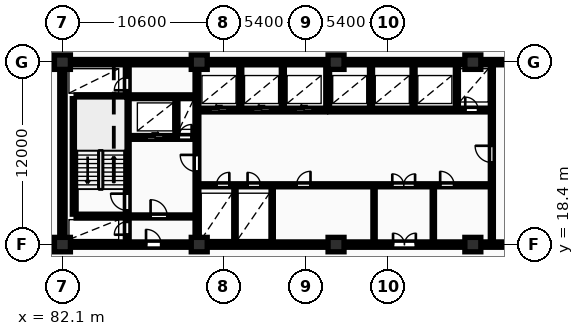
"""IFC4 building model, lengths in metres.
Left out: names, types, materials, properties, quantities, classifications, styles, units other than length and angle.
Written with IfcOpenShell. Run it as: python <this file> out.ifc"""

import sys

from ifc_helpers import new_model, si_unit, direction, frame, frame_2d, origin, origin_2d, place, context, subcontext, project, spatial, rectangle, extrude, element, fill, save


model = new_model("IFC4")
c1 = context("Model", 3, precision=1e-05, world=origin(), true_north=direction((0.0, 1.0)))
c2 = subcontext(c1, "Body", "Model", "MODEL_VIEW")
j1 = project(units=[si_unit("LENGTHUNIT", "METRE"), si_unit("PLANEANGLEUNIT", "RADIAN")], contexts=[c1])
p1 = place(None, origin())
s1 = spatial("IfcSite", under=j1, at=p1, CompositionType="ELEMENT")
p2 = place(p1, origin())
s2 = spatial("IfcBuilding", under=s1, at=p2, CompositionType="ELEMENT")
p3 = place(p2, frame((0.0, 0.0, -3.6)))
s3 = spatial("IfcBuildingStorey", under=s2, at=p3, CompositionType="ELEMENT", Elevation=-3.6)
for number, where, z_axis, x_axis in (
    (1, (82.1, 18.4, 0.0), (0.0, 0.0, 1.0), (1.0, 0.0, 0.0)),
    (2, (82.1, 30.4, 0.0), (0.0, 0.0, 1.0), (1.0, 0.0, 0.0)),
    (3, (91.1, 18.4, 0.0), (0.0, 0.0, 1.0), (1.0, 0.0, 0.0)),
    (4, (91.1, 30.4, 0.0), (0.0, 0.0, 1.0), (1.0, 0.0, 0.0)),
    (5, (100.1, 18.4, 0.0), (0.0, 0.0, 1.0), (1.0, 0.0, 0.0)),
    (6, (100.1, 30.4, 0.0), (0.0, 0.0, 1.0), (1.0, 0.0, 0.0)),
    (7, (109.1, 18.4, 0.0), (0.0, 0.0, 1.0), (1.0, 0.0, 0.0)),
    (8, (109.1, 30.4, 0.0), (0.0, 0.0, 1.0), (1.0, 0.0, 0.0)),
):
    element("IfcColumn", number, at=place(p3, frame(where, z_axis=z_axis, x_axis=x_axis)), inside=s3, PredefinedType="COLUMN", context=c2, shape_type="SweptSolid", body=[
        extrude(rectangle(XDim=1.05, YDim=0.95, at=origin_2d()), origin(), (0.0, 0.0, 1.0), 3.6),
    ])
p4 = place(p3, frame((81.925, 30.4, 0.0), z_axis=(0.0, 0.0, 1.0), x_axis=(1.0, 0.0, 0.0)))
e9 = element("IfcWall", 9, at=p4, inside=s3, PredefinedType="SHEAR", context=c2, shape_type="SweptSolid", body=[
    extrude(rectangle(XDim=36.265, YDim=0.35, at=frame_2d((18.132, 0.0))), origin(), (0.0, 0.0, 1.0), 3.6),
])
p5 = place(p3, frame((82.1, 18.575, 0.0), z_axis=(0.0, 0.0, 1.0), x_axis=(0.0, 1.0, 0.0)))
e10 = element("IfcWall", 10, at=p5, inside=s3, PredefinedType="SHEAR", context=c2, shape_type="SweptSolid", body=[
    extrude(rectangle(XDim=11.65, YDim=0.35, at=frame_2d((5.825, 0.0))), origin(), (0.0, 0.0, 1.0), 3.6),
])
p6 = place(p3, frame((81.925, 18.4, 0.0), z_axis=(0.0, 0.0, 1.0), x_axis=(1.0, 0.0, 0.0)))
e11 = element("IfcWall", 11, at=p6, inside=s3, PredefinedType="SHEAR", context=c2, shape_type="SweptSolid", body=[
    extrude(rectangle(XDim=36.265, YDim=0.35, at=frame_2d((18.132, 0.0))), origin(), (0.0, 0.0, 1.0), 3.6),
])
p7 = place(p6, frame((5.675, 0.0, 0.0)))
e12 = element("IfcOpeningElement", 12, at=p7, cuts=e11, PredefinedType="OPENING", context=c2, shape_type="SweptSolid", body=[
    extrude(rectangle(XDim=1.0, YDim=2.15, at=frame_2d((0.5, 1.075))), frame((0.0, 0.185, 0.0), z_axis=(0.0, -1.0, 0.0), x_axis=(1.0, 0.0, 0.0)), (0.0, 0.0, 1.0), 0.37),
])
p8 = place(p6, frame((21.925, 0.0, 0.0)))
e13 = element("IfcOpeningElement", 13, at=p8, cuts=e11, PredefinedType="OPENING", context=c2, shape_type="SweptSolid", body=[
    extrude(rectangle(XDim=1.5, YDim=2.2, at=frame_2d((0.75, 1.1))), frame((0.0, 0.185, 0.0), z_axis=(0.0, -1.0, 0.0), x_axis=(1.0, 0.0, 0.0)), (0.0, 0.0, 1.0), 0.37),
])
p9 = place(p6, frame((29.875, 0.0, 0.0)))
e14 = element("IfcOpeningElement", 14, at=p9, cuts=e11, PredefinedType="OPENING", context=c2, shape_type="SweptSolid", body=[
    extrude(rectangle(XDim=1.0, YDim=2.15, at=frame_2d((0.5, 1.075))), frame((0.0, 0.185, 0.0), z_axis=(0.0, -1.0, 0.0), x_axis=(1.0, 0.0, 0.0)), (0.0, 0.0, 1.0), 0.37),
])
p10 = place(p3, frame((82.875, 20.4, 0.0), z_axis=(0.0, 0.0, 1.0), x_axis=(0.0, 1.0, 0.0)))
e15 = element("IfcWall", 15, at=p10, inside=s3, PredefinedType="SHEAR", context=c2, shape_type="SweptSolid", body=[
    extrude(rectangle(XDim=7.6, YDim=0.25, at=frame_2d((3.8, 0.0))), origin(), (0.0, 0.0, 1.0), 3.6),
])
p11 = place(p3, frame((86.365, 18.6, 0.0), z_axis=(0.0, 0.0, 1.0), x_axis=(0.0, 1.0, 0.0)))
e16 = element("IfcWall", 16, at=p11, inside=s3, PredefinedType="SHEAR", context=c2, shape_type="SweptSolid", body=[
    extrude(rectangle(XDim=11.6, YDim=0.25, at=frame_2d((5.8, 0.0))), origin(), (0.0, 0.0, 1.0), 3.6),
])
p12 = place(p11, frame((0.45, 0.0, 0.0)))
e17 = element("IfcOpeningElement", 17, at=p12, cuts=e16, PredefinedType="OPENING", context=c2, shape_type="SweptSolid", body=[
    extrude(rectangle(XDim=0.85, YDim=2.05, at=frame_2d((0.425, 1.025))), frame((0.0, 0.135, 0.0), z_axis=(0.0, -1.0, 0.0), x_axis=(1.0, 0.0, 0.0)), (0.0, 0.0, 1.0), 0.27),
])
p13 = place(p11, frame((2.05, 0.0, 0.0)))
e18 = element("IfcOpeningElement", 18, at=p13, cuts=e16, PredefinedType="OPENING", context=c2, shape_type="SweptSolid", body=[
    extrude(rectangle(XDim=1.1, YDim=2.1, at=frame_2d((0.55, 1.05))), frame((0.0, 0.135, 0.0), z_axis=(0.0, -1.0, 0.0), x_axis=(1.0, 0.0, 0.0)), (0.0, 0.0, 1.0), 0.27),
])
p14 = place(p11, frame((9.95, 0.0, 0.0)))
e19 = element("IfcOpeningElement", 19, at=p14, cuts=e16, PredefinedType="OPENING", context=c2, shape_type="SweptSolid", body=[
    extrude(rectangle(XDim=0.85, YDim=2.05, at=frame_2d((0.425, 1.025))), frame((0.0, 0.135, 0.0), z_axis=(0.0, -1.0, 0.0), x_axis=(1.0, 0.0, 0.0)), (0.0, 0.0, 1.0), 0.27),
])
p15 = place(p3, frame((83.0, 20.275, 0.0), z_axis=(0.0, 0.0, 1.0), x_axis=(1.0, 0.0, 0.0)))
e20 = element("IfcWall", 20, at=p15, inside=s3, PredefinedType="SHEAR", context=c2, shape_type="SweptSolid", body=[
    extrude(rectangle(XDim=3.24, YDim=0.25, at=frame_2d((1.62, 0.0))), origin(), (0.0, 0.0, 1.0), 3.6),
])
p16 = place(p3, frame((83.0, 28.125, 0.0), z_axis=(0.0, 0.0, 1.0), x_axis=(1.0, 0.0, 0.0)))
e21 = element("IfcWall", 21, at=p16, inside=s3, PredefinedType="SHEAR", context=c2, shape_type="SweptSolid", body=[
    extrude(rectangle(XDim=7.82, YDim=0.25, at=frame_2d((3.91, 0.0))), origin(), (0.0, 0.0, 1.0), 3.6),
])
p17 = place(p3, frame((86.5, 25.45, 0.0), z_axis=(0.0, 0.0, 1.0), x_axis=(1.0, 0.0, 0.0)))
e22 = element("IfcWall", 22, at=p17, inside=s3, PredefinedType="SHEAR", context=c2, shape_type="SweptSolid", body=[
    extrude(rectangle(XDim=4.32, YDim=0.25, at=frame_2d((2.16, 0.0))), origin(), (0.0, 0.0, 1.0), 3.6),
])
p18 = place(p17, frame((1.14, 0.0, 0.0)))
e23 = element("IfcOpeningElement", 23, at=p18, cuts=e22, PredefinedType="OPENING", context=c2, shape_type="SweptSolid", body=[
    extrude(rectangle(XDim=1.12, YDim=2.12, at=frame_2d((0.56, 1.06))), frame((0.0, 0.135, 0.0), z_axis=(0.0, -1.0, 0.0), x_axis=(1.0, 0.0, 0.0)), (0.0, 0.0, 1.0), 0.27),
])
p19 = place(p17, frame((3.25, 0.0, 0.0)))
e24 = element("IfcOpeningElement", 24, at=p19, cuts=e22, PredefinedType="OPENING", context=c2, shape_type="SweptSolid", body=[
    extrude(rectangle(XDim=0.85, YDim=2.05, at=frame_2d((0.425, 1.025))), frame((0.0, 0.135, 0.0), z_axis=(0.0, -1.0, 0.0), x_axis=(1.0, 0.0, 0.0)), (0.0, 0.0, 1.0), 0.27),
])
p20 = place(p3, frame((89.6, 25.58, 0.0), z_axis=(0.0, 0.0, 1.0), x_axis=(0.0, 1.0, 0.0)))
e25 = element("IfcWall", 25, at=p20, inside=s3, PredefinedType="PARTITIONING", context=c2, shape_type="SweptSolid", body=[
    extrude(rectangle(XDim=2.42, YDim=0.2, at=frame_2d((1.21, 0.0))), origin(), (0.0, 0.0, 1.0), 3.3),
])
p21 = place(p3, frame((86.5, 20.25, 0.0), z_axis=(0.0, 0.0, 1.0), x_axis=(1.0, 0.0, 0.0)))
e26 = element("IfcWall", 26, at=p21, inside=s3, PredefinedType="PARTITIONING", context=c2, shape_type="SweptSolid", body=[
    extrude(rectangle(XDim=4.32, YDim=0.2, at=frame_2d((2.16, 0.0))), origin(), (0.0, 0.0, 1.0), 3.3),
])
p22 = place(p21, frame((1.4, 0.0, 0.0)))
e27 = element("IfcOpeningElement", 27, at=p22, cuts=e26, PredefinedType="OPENING", context=c2, shape_type="SweptSolid", body=[
    extrude(rectangle(XDim=1.1, YDim=2.1, at=frame_2d((0.55, 1.05))), frame((0.0, 0.11, 0.0), z_axis=(0.0, -1.0, 0.0), x_axis=(1.0, 0.0, 0.0)), (0.0, 0.0, 1.0), 0.22),
])
p23 = place(p3, frame((90.95, 18.6, 0.0), z_axis=(0.0, 0.0, 1.0), x_axis=(0.0, 1.0, 0.0)))
e28 = element("IfcWall", 28, at=p23, inside=s3, PredefinedType="SHEAR", context=c2, shape_type="SweptSolid", body=[
    extrude(rectangle(XDim=11.6, YDim=0.25, at=frame_2d((5.8, 0.0))), origin(), (0.0, 0.0, 1.0), 3.6),
])
p24 = place(p23, frame((4.6, 0.0, 0.0)))
e29 = element("IfcOpeningElement", 29, at=p24, cuts=e28, PredefinedType="OPENING", context=c2, shape_type="SweptSolid", body=[
    extrude(rectangle(XDim=1.1, YDim=2.1, at=frame_2d((0.55, 1.05))), frame((0.0, 0.135, 0.0), z_axis=(0.0, -1.0, 0.0), x_axis=(1.0, 0.0, 0.0)), (0.0, 0.0, 1.0), 0.27),
])
for number, where, z_axis, x_axis in (
    (30, (93.8, 27.38, 0.0), (0.0, 0.0, 1.0), (0.0, 1.0, 0.0)),
    (31, (96.6, 27.38, 0.0), (0.0, 0.0, 1.0), (0.0, 1.0, 0.0)),
):
    element("IfcWall", number, at=place(p3, frame(where, z_axis=z_axis, x_axis=x_axis)), inside=s3, PredefinedType="PARTITIONING", context=c2, shape_type="SweptSolid", body=[
        extrude(rectangle(XDim=2.82, YDim=0.2, at=frame_2d((1.41, 0.0))), origin(), (0.0, 0.0, 1.0), 3.3),
    ])
p25 = place(p3, frame((91.08, 27.25, 0.0), z_axis=(0.0, 0.0, 1.0), x_axis=(1.0, 0.0, 0.0)))
e32 = element("IfcWall", 32, at=p25, inside=s3, PredefinedType="SHEAR", context=c2, shape_type="SweptSolid", body=[
    extrude(rectangle(XDim=8.34, YDim=0.25, at=frame_2d((4.17, 0.0))), origin(), (0.0, 0.0, 1.0), 3.6),
])
p26 = place(p25, frame((0.76, 0.0, 0.0)))
e33 = element("IfcOpeningElement", 33, at=p26, cuts=e32, PredefinedType="OPENING", context=c2, shape_type="SweptSolid", body=[
    extrude(rectangle(XDim=1.12, YDim=2.12, at=frame_2d((0.56, 1.06))), frame((0.0, 0.135, 0.0), z_axis=(0.0, -1.0, 0.0), x_axis=(1.0, 0.0, 0.0)), (0.0, 0.0, 1.0), 0.27),
])
p27 = place(p25, frame((3.56, 0.0, 0.0)))
e34 = element("IfcOpeningElement", 34, at=p27, cuts=e32, PredefinedType="OPENING", context=c2, shape_type="SweptSolid", body=[
    extrude(rectangle(XDim=1.12, YDim=2.12, at=frame_2d((0.56, 1.06))), frame((0.0, 0.135, 0.0), z_axis=(0.0, -1.0, 0.0), x_axis=(1.0, 0.0, 0.0)), (0.0, 0.0, 1.0), 0.27),
])
p28 = place(p25, frame((6.36, 0.0, 0.0)))
e35 = element("IfcOpeningElement", 35, at=p28, cuts=e32, PredefinedType="OPENING", context=c2, shape_type="SweptSolid", body=[
    extrude(rectangle(XDim=1.12, YDim=2.12, at=frame_2d((0.56, 1.06))), frame((0.0, 0.135, 0.0), z_axis=(0.0, -1.0, 0.0), x_axis=(1.0, 0.0, 0.0)), (0.0, 0.0, 1.0), 0.27),
])
p29 = place(p3, frame((99.55, 27.25, 0.0), z_axis=(0.0, 0.0, 1.0), x_axis=(0.0, 1.0, 0.0)))
e36 = element("IfcWall", 36, at=p29, inside=s3, PredefinedType="SHEAR", context=c2, shape_type="SweptSolid", body=[
    extrude(rectangle(XDim=2.95, YDim=0.25, at=frame_2d((1.475, 0.0))), origin(), (0.0, 0.0, 1.0), 3.6),
])
for number, where, z_axis, x_axis in (
    (37, (102.4, 27.38, 0.0), (0.0, 0.0, 1.0), (0.0, 1.0, 0.0)),
    (38, (105.2, 27.38, 0.0), (0.0, 0.0, 1.0), (0.0, 1.0, 0.0)),
    (39, (108.05, 27.38, 0.0), (0.0, 0.0, 1.0), (0.0, 1.0, 0.0)),
):
    element("IfcWall", number, at=place(p3, frame(where, z_axis=z_axis, x_axis=x_axis)), inside=s3, PredefinedType="PARTITIONING", context=c2, shape_type="SweptSolid", body=[
        extrude(rectangle(XDim=2.82, YDim=0.2, at=frame_2d((1.41, 0.0))), origin(), (0.0, 0.0, 1.0), 3.3),
    ])
p30 = place(p3, frame((99.68, 27.25, 0.0), z_axis=(0.0, 0.0, 1.0), x_axis=(1.0, 0.0, 0.0)))
e40 = element("IfcWall", 40, at=p30, inside=s3, PredefinedType="SHEAR", context=c2, shape_type="SweptSolid", body=[
    extrude(rectangle(XDim=10.54, YDim=0.25, at=frame_2d((5.27, 0.0))), origin(), (0.0, 0.0, 1.0), 3.6),
])
p31 = place(p30, frame((8.92, 0.0, 0.0)))
e41 = element("IfcOpeningElement", 41, at=p31, cuts=e40, PredefinedType="OPENING", context=c2, shape_type="SweptSolid", body=[
    extrude(rectangle(XDim=0.85, YDim=2.05, at=frame_2d((0.425, 1.025))), frame((0.0, 0.135, 0.0), z_axis=(0.0, -1.0, 0.0), x_axis=(1.0, 0.0, 0.0)), (0.0, 0.0, 1.0), 0.27),
])
for number, where, z_axis, x_axis in (
    (42, (93.45, 18.6, 0.0), (0.0, 0.0, 1.0), (0.0, 1.0, 0.0)),
    (43, (95.9, 18.6, 0.0), (0.0, 0.0, 1.0), (0.0, 1.0, 0.0)),
    (44, (102.6, 18.6, 0.0), (0.0, 0.0, 1.0), (0.0, 1.0, 0.0)),
    (45, (106.5, 18.6, 0.0), (0.0, 0.0, 1.0), (0.0, 1.0, 0.0)),
):
    element("IfcWall", number, at=place(p3, frame(where, z_axis=z_axis, x_axis=x_axis)), inside=s3, PredefinedType="PARTITIONING", context=c2, shape_type="SweptSolid", body=[
        extrude(rectangle(XDim=3.6, YDim=0.15, at=frame_2d((1.8, 0.0))), origin(), (0.0, 0.0, 1.0), 3.3),
    ])
p32 = place(p3, frame((91.08, 22.3, 0.0), z_axis=(0.0, 0.0, 1.0), x_axis=(1.0, 0.0, 0.0)))
e46 = element("IfcWall", 46, at=p32, inside=s3, PredefinedType="PARTITIONING", context=c2, shape_type="SweptSolid", body=[
    extrude(rectangle(XDim=19.14, YDim=0.2, at=frame_2d((9.57, 0.0))), origin(), (0.0, 0.0, 1.0), 3.3),
])
p33 = place(p32, frame((1.15, 0.0, 0.0)))
e47 = element("IfcOpeningElement", 47, at=p33, cuts=e46, PredefinedType="OPENING", context=c2, shape_type="SweptSolid", body=[
    extrude(rectangle(XDim=0.85, YDim=2.05, at=frame_2d((0.425, 1.025))), frame((0.0, 0.11, 0.0), z_axis=(0.0, -1.0, 0.0), x_axis=(1.0, 0.0, 0.0)), (0.0, 0.0, 1.0), 0.22),
])
p34 = place(p32, frame((3.2, 0.0, 0.0)))
e48 = element("IfcOpeningElement", 48, at=p34, cuts=e46, PredefinedType="OPENING", context=c2, shape_type="SweptSolid", body=[
    extrude(rectangle(XDim=0.85, YDim=2.05, at=frame_2d((0.425, 1.025))), frame((0.0, 0.11, 0.0), z_axis=(0.0, -1.0, 0.0), x_axis=(1.0, 0.0, 0.0)), (0.0, 0.0, 1.0), 0.22),
])
p35 = place(p32, frame((12.72, 0.0, 0.0)))
e49 = element("IfcOpeningElement", 49, at=p35, cuts=e46, PredefinedType="OPENING", context=c2, shape_type="SweptSolid", body=[
    extrude(rectangle(XDim=1.5, YDim=2.2, at=frame_2d((0.75, 1.1))), frame((0.0, 0.11, 0.0), z_axis=(0.0, -1.0, 0.0), x_axis=(1.0, 0.0, 0.0)), (0.0, 0.0, 1.0), 0.22),
])
p36 = place(p32, frame((6.42, 0.0, 0.0)))
e50 = element("IfcOpeningElement", 50, at=p36, cuts=e46, PredefinedType="OPENING", context=c2, shape_type="SweptSolid", body=[
    extrude(rectangle(XDim=0.92, YDim=2.08, at=frame_2d((0.46, 1.04))), frame((0.0, 0.11, 0.0), z_axis=(0.0, -1.0, 0.0), x_axis=(1.0, 0.0, 0.0)), (0.0, 0.0, 1.0), 0.22),
])
p37 = place(p32, frame((15.87, 0.0, 0.0)))
e51 = element("IfcOpeningElement", 51, at=p37, cuts=e46, PredefinedType="OPENING", context=c2, shape_type="SweptSolid", body=[
    extrude(rectangle(XDim=0.92, YDim=2.08, at=frame_2d((0.46, 1.04))), frame((0.0, 0.11, 0.0), z_axis=(0.0, -1.0, 0.0), x_axis=(1.0, 0.0, 0.0)), (0.0, 0.0, 1.0), 0.22),
])
p38 = place(p3, frame((110.35, 18.6, 0.0), z_axis=(0.0, 0.0, 1.0), x_axis=(0.0, 1.0, 0.0)))
e52 = element("IfcWall", 52, at=p38, inside=s3, PredefinedType="PARTITIONING", context=c2, shape_type="SweptSolid", body=[
    extrude(rectangle(XDim=11.6, YDim=0.2, at=frame_2d((5.8, 0.0))), origin(), (0.0, 0.0, 1.0), 3.3),
])
p39 = place(p38, frame((5.2, 0.0, 0.0)))
e53 = element("IfcOpeningElement", 53, at=p39, cuts=e52, PredefinedType="OPENING", context=c2, shape_type="SweptSolid", body=[
    extrude(rectangle(XDim=1.1, YDim=2.15, at=frame_2d((0.55, 1.075))), frame((0.0, 0.11, 0.0), z_axis=(0.0, -1.0, 0.0), x_axis=(1.0, 0.0, 0.0)), (0.0, 0.0, 1.0), 0.22),
])
p40 = place(p7, origin())
e54 = element("IfcDoor", 54, at=p40, inside=s3, OperationType="SINGLE_SWING_LEFT", PredefinedType="DOOR", context=c2, shape_type="SweptSolid", body=[
    extrude(rectangle(XDim=1.0, YDim=2.15, at=frame_2d((0.5, 1.075))), frame((0.0, 0.025, 0.0), z_axis=(0.0, -1.0, 0.0), x_axis=(1.0, 0.0, 0.0)), (0.0, 0.0, 1.0), 0.05),
])
fill(e12, e54)
p41 = place(p8, origin())
e55 = element("IfcDoor", 55, at=p41, inside=s3, OperationType="DOUBLE_DOOR_SINGLE_SWING", PredefinedType="DOOR", context=c2, shape_type="SweptSolid", body=[
    extrude(rectangle(XDim=1.5, YDim=2.2, at=frame_2d((0.75, 1.1))), frame((0.0, 0.025, 0.0), z_axis=(0.0, -1.0, 0.0), x_axis=(1.0, 0.0, 0.0)), (0.0, 0.0, 1.0), 0.05),
])
fill(e13, e55)
p42 = place(p12, origin())
e56 = element("IfcDoor", 56, at=p42, inside=s3, OperationType="SINGLE_SWING_LEFT", PredefinedType="DOOR", context=c2, shape_type="SweptSolid", body=[
    extrude(rectangle(XDim=0.85, YDim=2.05, at=frame_2d((0.425, 1.025))), frame((0.0, 0.025, 0.0), z_axis=(0.0, -1.0, 0.0), x_axis=(1.0, 0.0, 0.0)), (0.0, 0.0, 1.0), 0.05),
])
fill(e17, e56)
p43 = place(p13, origin())
e57 = element("IfcDoor", 57, at=p43, inside=s3, OperationType="SINGLE_SWING_RIGHT", PredefinedType="DOOR", context=c2, shape_type="SweptSolid", body=[
    extrude(rectangle(XDim=1.1, YDim=2.1, at=frame_2d((0.55, 1.05))), frame((0.0, 0.025, 0.0), z_axis=(0.0, -1.0, 0.0), x_axis=(1.0, 0.0, 0.0)), (0.0, 0.0, 1.0), 0.05),
])
fill(e18, e57)
p44 = place(p14, origin())
e58 = element("IfcDoor", 58, at=p44, inside=s3, OperationType="SINGLE_SWING_LEFT", PredefinedType="DOOR", context=c2, shape_type="SweptSolid", body=[
    extrude(rectangle(XDim=0.85, YDim=2.05, at=frame_2d((0.425, 1.025))), frame((0.0, 0.025, 0.0), z_axis=(0.0, -1.0, 0.0), x_axis=(1.0, 0.0, 0.0)), (0.0, 0.0, 1.0), 0.05),
])
fill(e19, e58)
p45 = place(p18, origin())
e59 = element("IfcDoor", 59, at=p45, inside=s3, OperationType="SLIDING_TO_RIGHT", PredefinedType="DOOR", context=c2, shape_type="SweptSolid", body=[
    extrude(rectangle(XDim=1.12, YDim=2.12, at=frame_2d((0.56, 1.06))), frame((0.0, 0.025, 0.0), z_axis=(0.0, -1.0, 0.0), x_axis=(1.0, 0.0, 0.0)), (0.0, 0.0, 1.0), 0.05),
])
fill(e23, e59)
p46 = place(p19, origin())
e60 = element("IfcDoor", 60, at=p46, inside=s3, OperationType="SINGLE_SWING_RIGHT", PredefinedType="DOOR", context=c2, shape_type="SweptSolid", body=[
    extrude(rectangle(XDim=0.85, YDim=2.05, at=frame_2d((0.425, 1.025))), frame((0.0, 0.025, 0.0), z_axis=(0.0, -1.0, 0.0), x_axis=(1.0, 0.0, 0.0)), (0.0, 0.0, 1.0), 0.05),
])
fill(e24, e60)
p47 = place(p22, origin())
e61 = element("IfcDoor", 61, at=p47, inside=s3, OperationType="SINGLE_SWING_LEFT", PredefinedType="DOOR", context=c2, shape_type="SweptSolid", body=[
    extrude(rectangle(XDim=1.1, YDim=2.1, at=frame_2d((0.55, 1.05))), frame((0.0, 0.025, 0.0), z_axis=(0.0, -1.0, 0.0), x_axis=(1.0, 0.0, 0.0)), (0.0, 0.0, 1.0), 0.05),
])
fill(e27, e61)
p48 = place(p24, origin())
e62 = element("IfcDoor", 62, at=p48, inside=s3, OperationType="SINGLE_SWING_RIGHT", PredefinedType="DOOR", context=c2, shape_type="SweptSolid", body=[
    extrude(rectangle(XDim=1.1, YDim=2.1, at=frame_2d((0.55, 1.05))), frame((0.0, 0.025, 0.0), z_axis=(0.0, -1.0, 0.0), x_axis=(1.0, 0.0, 0.0)), (0.0, 0.0, 1.0), 0.05),
])
fill(e29, e62)
p49 = place(p26, origin())
e63 = element("IfcDoor", 63, at=p49, inside=s3, OperationType="SLIDING_TO_LEFT", PredefinedType="DOOR", context=c2, shape_type="SweptSolid", body=[
    extrude(rectangle(XDim=1.12, YDim=2.12, at=frame_2d((0.56, 1.06))), frame((0.0, 0.025, 0.0), z_axis=(0.0, -1.0, 0.0), x_axis=(1.0, 0.0, 0.0)), (0.0, 0.0, 1.0), 0.05),
])
fill(e33, e63)
p50 = place(p27, origin())
e64 = element("IfcDoor", 64, at=p50, inside=s3, OperationType="SLIDING_TO_LEFT", PredefinedType="DOOR", context=c2, shape_type="SweptSolid", body=[
    extrude(rectangle(XDim=1.12, YDim=2.12, at=frame_2d((0.56, 1.06))), frame((0.0, 0.025, 0.0), z_axis=(0.0, -1.0, 0.0), x_axis=(1.0, 0.0, 0.0)), (0.0, 0.0, 1.0), 0.05),
])
fill(e34, e64)
p51 = place(p28, origin())
e65 = element("IfcDoor", 65, at=p51, inside=s3, OperationType="SLIDING_TO_LEFT", PredefinedType="DOOR", context=c2, shape_type="SweptSolid", body=[
    extrude(rectangle(XDim=1.12, YDim=2.12, at=frame_2d((0.56, 1.06))), frame((0.0, 0.025, 0.0), z_axis=(0.0, -1.0, 0.0), x_axis=(1.0, 0.0, 0.0)), (0.0, 0.0, 1.0), 0.05),
])
fill(e35, e65)
p52 = place(p31, origin())
e66 = element("IfcDoor", 66, at=p52, inside=s3, OperationType="SINGLE_SWING_LEFT", PredefinedType="DOOR", context=c2, shape_type="SweptSolid", body=[
    extrude(rectangle(XDim=0.85, YDim=2.05, at=frame_2d((0.425, 1.025))), frame((0.0, 0.025, 0.0), z_axis=(0.0, -1.0, 0.0), x_axis=(1.0, 0.0, 0.0)), (0.0, 0.0, 1.0), 0.05),
])
fill(e41, e66)
p53 = place(p33, origin())
e67 = element("IfcDoor", 67, at=p53, inside=s3, OperationType="SINGLE_SWING_RIGHT", PredefinedType="DOOR", context=c2, shape_type="SweptSolid", body=[
    extrude(rectangle(XDim=0.85, YDim=2.05, at=frame_2d((0.425, 1.025))), frame((0.0, 0.025, 0.0), z_axis=(0.0, -1.0, 0.0), x_axis=(1.0, 0.0, 0.0)), (0.0, 0.0, 1.0), 0.05),
])
fill(e47, e67)
p54 = place(p34, origin())
e68 = element("IfcDoor", 68, at=p54, inside=s3, OperationType="SINGLE_SWING_LEFT", PredefinedType="DOOR", context=c2, shape_type="SweptSolid", body=[
    extrude(rectangle(XDim=0.85, YDim=2.05, at=frame_2d((0.425, 1.025))), frame((0.0, 0.025, 0.0), z_axis=(0.0, -1.0, 0.0), x_axis=(1.0, 0.0, 0.0)), (0.0, 0.0, 1.0), 0.05),
])
fill(e48, e68)
p55 = place(p35, origin())
e69 = element("IfcDoor", 69, at=p55, inside=s3, OperationType="DOUBLE_DOOR_SINGLE_SWING", PredefinedType="DOOR", context=c2, shape_type="SweptSolid", body=[
    extrude(rectangle(XDim=1.5, YDim=2.2, at=frame_2d((0.75, 1.1))), frame((0.0, 0.025, 0.0), z_axis=(0.0, -1.0, 0.0), x_axis=(1.0, 0.0, 0.0)), (0.0, 0.0, 1.0), 0.05),
])
fill(e49, e69)
p56 = place(p36, origin())
e70 = element("IfcDoor", 70, at=p56, inside=s3, OperationType="SINGLE_SWING_RIGHT", PredefinedType="DOOR", context=c2, shape_type="SweptSolid", body=[
    extrude(rectangle(XDim=0.92, YDim=2.08, at=frame_2d((0.46, 1.04))), frame((0.0, 0.025, 0.0), z_axis=(0.0, -1.0, 0.0), x_axis=(1.0, 0.0, 0.0)), (0.0, 0.0, 1.0), 0.05),
])
fill(e50, e70)
p57 = place(p37, origin())
e71 = element("IfcDoor", 71, at=p57, inside=s3, OperationType="SINGLE_SWING_LEFT", PredefinedType="DOOR", context=c2, shape_type="SweptSolid", body=[
    extrude(rectangle(XDim=0.92, YDim=2.08, at=frame_2d((0.46, 1.04))), frame((0.0, 0.025, 0.0), z_axis=(0.0, -1.0, 0.0), x_axis=(1.0, 0.0, 0.0)), (0.0, 0.0, 1.0), 0.05),
])
fill(e51, e71)
p58 = place(p39, origin())
e72 = element("IfcDoor", 72, at=p58, inside=s3, OperationType="SINGLE_SWING_RIGHT", PredefinedType="DOOR", context=c2, shape_type="SweptSolid", body=[
    extrude(rectangle(XDim=1.1, YDim=2.15, at=frame_2d((0.55, 1.075))), frame((0.0, 0.025, 0.0), z_axis=(0.0, -1.0, 0.0), x_axis=(1.0, 0.0, 0.0)), (0.0, 0.0, 1.0), 0.05),
])
fill(e53, e72)
save(model, sys.argv[1])
